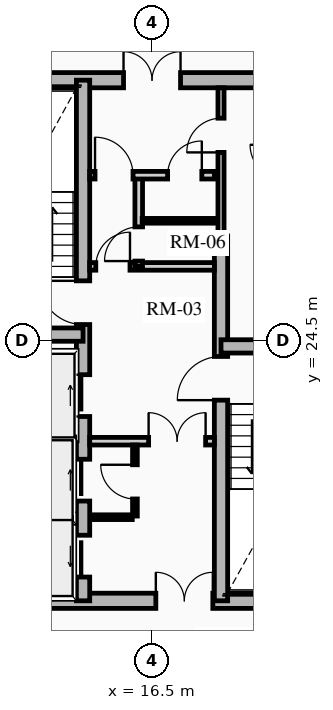
"""IFC4 building model, lengths in metres.
Left out: names, types, materials, properties, quantities, classifications, styles, units other than length and angle.
Written with IfcOpenShell. Run it as: python <this file> out.ifc"""

import sys

from ifc_helpers import new_model, si_unit, direction, frame, frame_2d, origin, place, context, subcontext, project, spatial, rectangle, extrude, source, transform, mapped, element, fill, save


model = new_model("IFC4")
c1 = context("Model", 3, precision=1e-05, world=origin(), true_north=direction((0.0, 1.0)))
c2 = subcontext(c1, "Body", "Model", "MODEL_VIEW")
j1 = project(units=[si_unit("LENGTHUNIT", "METRE"), si_unit("PLANEANGLEUNIT", "RADIAN")], contexts=[c1])
p1 = place(None, origin())
s1 = spatial("IfcSite", under=j1, at=p1, CompositionType="ELEMENT")
p2 = place(p1, origin())
s2 = spatial("IfcBuilding", under=s1, at=p2, CompositionType="ELEMENT")
p3 = place(p2, frame((0.0, 0.0, 169.06)))
s3 = spatial("IfcBuildingStorey", under=s2, at=p3, CompositionType="ELEMENT", Elevation=169.06)
p4 = place(p3, frame((11.15, 17.65, 0.0), z_axis=(0.0, 0.0, 1.0), x_axis=(1.0, 0.0, 0.0)))
e1 = element("IfcWall", 1, at=p4, inside=s3, PredefinedType="SHEAR", context=c2, shape_type="SweptSolid", body=[
    extrude(rectangle(XDim=10.7, YDim=0.4, at=frame_2d((5.35, 0.0))), origin(), (0.0, 0.0, 1.0), 2.91),
])
m1 = source(origin(), c2, "Body", "SweptSolid", [
    extrude(rectangle(XDim=1.5, YDim=2.02, at=frame_2d((0.75, 1.01))), frame((0.0, 0.21, 0.0), z_axis=(0.0, -1.0, 0.0), x_axis=(1.0, 0.0, 0.0)), (0.0, 0.0, 1.0), 0.42),
])
p5 = place(p4, frame((5.45, 0.0, 0.0)))
e2 = element("IfcOpeningElement", 2, at=p5, cuts=e1, PredefinedType="OPENING", context=c2, shape_type="MappedRepresentation", body=[
    mapped(m1, transform((0.0, 0.0, 0.0), x_axis=(1.0, 0.0, 0.0), y_axis=(0.0, 1.0, 0.0), z_axis=(0.0, 0.0, 1.0), scale=1.0)),
])
p6 = place(p3, frame((11.15, 31.35, 0.0), z_axis=(0.0, 0.0, 1.0), x_axis=(1.0, 0.0, 0.0)))
e3 = element("IfcWall", 3, at=p6, inside=s3, PredefinedType="SHEAR", context=c2, shape_type="SweptSolid", body=[
    extrude(rectangle(XDim=10.7, YDim=0.4, at=frame_2d((5.35, 0.0))), origin(), (0.0, 0.0, 1.0), 2.91),
])
p7 = place(p6, frame((4.6, 0.0, 0.0)))
e4 = element("IfcOpeningElement", 4, at=p7, cuts=e3, PredefinedType="OPENING", context=c2, shape_type="MappedRepresentation", body=[
    mapped(m1, transform((0.0, 0.0, 0.0), x_axis=(1.0, 0.0, 0.0), y_axis=(0.0, 1.0, 0.0), z_axis=(0.0, 0.0, 1.0), scale=1.0)),
])
p8 = place(p3, frame((14.685, 17.65, 0.0), z_axis=(0.0, 0.0, 1.0), x_axis=(0.0, 1.0, 0.0)))
e5 = element("IfcWall", 5, at=p8, inside=s3, PredefinedType="SHEAR", context=c2, shape_type="SweptSolid", body=[
    extrude(rectangle(XDim=13.7, YDim=0.35, at=frame_2d((6.85, 0.0))), origin(), (0.0, 0.0, 1.0), 2.91),
])
m2 = source(origin(), c2, "Body", "SweptSolid", [
    extrude(rectangle(XDim=1.1, YDim=2.015, at=frame_2d((0.55, 1.007))), frame((0.0, 0.185, 0.0), z_axis=(0.0, -1.0, 0.0), x_axis=(1.0, 0.0, 0.0)), (0.0, 0.0, 1.0), 0.37),
])
p9 = place(p8, frame((4.85, 0.0, 0.0)))
e6 = element("IfcOpeningElement", 6, at=p9, cuts=e5, PredefinedType="OPENING", context=c2, shape_type="MappedRepresentation", body=[
    mapped(m2, transform((0.0, 0.0, 0.0), x_axis=(1.0, 0.0, 0.0), y_axis=(0.0, 1.0, 0.0), z_axis=(0.0, 0.0, 1.0), scale=1.0)),
])
p10 = place(p8, frame((0.625, 0.0, 0.0)))
e7 = element("IfcOpeningElement", 7, at=p10, cuts=e5, PredefinedType="OPENING", context=c2, shape_type="MappedRepresentation", body=[
    mapped(m2, transform((0.0, 0.0, 0.0), x_axis=(1.0, 0.0, 0.0), y_axis=(0.0, 1.0, 0.0), z_axis=(0.0, 0.0, 1.0), scale=1.0)),
])
p11 = place(p8, frame((2.625, 0.0, 0.0)))
e8 = element("IfcOpeningElement", 8, at=p11, cuts=e5, PredefinedType="OPENING", context=c2, shape_type="MappedRepresentation", body=[
    mapped(m2, transform((0.0, 0.0, 0.0), x_axis=(1.0, 0.0, 0.0), y_axis=(0.0, 1.0, 0.0), z_axis=(0.0, 0.0, 1.0), scale=1.0)),
])
m3 = source(origin(), c2, "Body", "SweptSolid", [
    extrude(rectangle(XDim=1.15, YDim=2.02, at=frame_2d((0.575, 1.01))), frame((0.0, 0.185, 0.0), z_axis=(0.0, -1.0, 0.0), x_axis=(1.0, 0.0, 0.0)), (0.0, 0.0, 1.0), 0.37),
])
p12 = place(p8, frame((7.27, 0.0, 0.0)))
e9 = element("IfcOpeningElement", 9, at=p12, cuts=e5, PredefinedType="OPENING", context=c2, shape_type="MappedRepresentation", body=[
    mapped(m3, transform((0.0, 0.0, 0.0), x_axis=(1.0, 0.0, 0.0), y_axis=(0.0, 1.0, 0.0), z_axis=(0.0, 0.0, 1.0), scale=1.0)),
])
p13 = place(p3, frame((18.315, 17.65, 0.0), z_axis=(0.0, 0.0, 1.0), x_axis=(0.0, 1.0, 0.0)))
e10 = element("IfcWall", 10, at=p13, inside=s3, PredefinedType="SHEAR", context=c2, shape_type="SweptSolid", body=[
    extrude(rectangle(XDim=9.6, YDim=0.35, at=frame_2d((4.8, 0.0))), origin(), (0.0, 0.0, 1.0), 2.91),
])
p14 = place(p13, frame((5.28, 0.0, 0.0)))
e11 = element("IfcOpeningElement", 11, at=p14, cuts=e10, PredefinedType="OPENING", context=c2, shape_type="MappedRepresentation", body=[
    mapped(m3, transform((0.0, 0.0, 0.0), x_axis=(1.0, 0.0, 0.0), y_axis=(0.0, 1.0, 0.0), z_axis=(0.0, 0.0, 1.0), scale=1.0)),
])
for number, where, z_axis, x_axis in (
    (12, (11.4, 24.655, 0.0), (0.0, 0.0, 1.0), (1.0, 0.0, 0.0)),
    (13, (18.315, 24.345, 0.0), (0.0, 0.0, 1.0), (1.0, 0.0, 0.0)),
):
    element("IfcWall", number, at=place(p3, frame(where, z_axis=z_axis, x_axis=x_axis)), inside=s3, PredefinedType="SHEAR", context=c2, shape_type="SweptSolid", body=[
        extrude(rectangle(XDim=3.285, YDim=0.35, at=frame_2d((1.643, 0.0))), origin(), (0.0, 0.0, 1.0), 2.91),
    ])
for number, where, z_axis, x_axis in (
    (14, (11.52, 21.8, 0.0), (0.0, 0.0, 1.0), (1.0, 0.0, 0.0)),
    (15, (11.52, 19.825, 0.0), (0.0, 0.0, 1.0), (1.0, 0.0, 0.0)),
):
    element("IfcWall", number, at=place(p3, frame(where, z_axis=z_axis, x_axis=x_axis)), inside=s3, PredefinedType="SHEAR", context=c2, shape_type="SweptSolid", body=[
        extrude(rectangle(XDim=2.97, YDim=0.2, at=frame_2d((1.485, 0.0))), origin(), (0.0, 0.0, 1.0), 2.91),
    ])
p15 = place(p3, frame((14.86, 21.85, 0.0), z_axis=(0.0, 0.0, 1.0), x_axis=(1.0, 0.0, 0.0)))
e16 = element("IfcWall", 16, at=p15, inside=s3, PredefinedType="PARTITIONING", context=c2, shape_type="SweptSolid", body=[
    extrude(rectangle(XDim=3.28, YDim=0.2, at=frame_2d((1.64, 0.0))), origin(), (0.0, 0.0, 1.0), 2.675),
])
m4 = source(origin(), c2, "Body", "SweptSolid", [
    extrude(rectangle(XDim=1.5, YDim=2.02, at=frame_2d((0.75, 1.01))), frame((0.0, 0.11, 0.0), z_axis=(0.0, -1.0, 0.0), x_axis=(1.0, 0.0, 0.0)), (0.0, 0.0, 1.0), 0.22),
])
p16 = place(p15, frame((1.55, 0.0, 0.0)))
e17 = element("IfcOpeningElement", 17, at=p16, cuts=e16, PredefinedType="OPENING", context=c2, shape_type="MappedRepresentation", body=[
    mapped(m4, transform((0.0, 0.0, 0.0), x_axis=(1.0, 0.0, 0.0), y_axis=(0.0, 1.0, 0.0), z_axis=(0.0, 0.0, 1.0), scale=1.0)),
])
p17 = place(p3, frame((14.86, 26.45, 0.0), z_axis=(0.0, 0.0, 1.0), x_axis=(1.0, 0.0, 0.0)))
e18 = element("IfcWall", 18, at=p17, inside=s3, PredefinedType="PARTITIONING", context=c2, shape_type="SweptSolid", body=[
    extrude(rectangle(XDim=3.28, YDim=0.2, at=frame_2d((1.64, 0.0))), origin(), (0.0, 0.0, 1.0), 2.675),
])
m5 = source(origin(), c2, "Body", "SweptSolid", [
    extrude(rectangle(XDim=0.9, YDim=2.005, at=frame_2d((0.45, 1.002))), frame((0.0, 0.11, 0.0), z_axis=(0.0, -1.0, 0.0), x_axis=(1.0, 0.0, 0.0)), (0.0, 0.0, 1.0), 0.22),
])
p18 = place(p17, frame((0.16, 0.0, 0.0)))
e19 = element("IfcOpeningElement", 19, at=p18, cuts=e18, PredefinedType="OPENING", context=c2, shape_type="MappedRepresentation", body=[
    mapped(m5, transform((0.0, 0.0, 0.0), x_axis=(1.0, 0.0, 0.0), y_axis=(0.0, 1.0, 0.0), z_axis=(0.0, 0.0, 1.0), scale=1.0)),
])
p19 = place(p3, frame((16.15, 26.45, 0.0), z_axis=(0.0, 0.0, 1.0), x_axis=(0.0, 1.0, 0.0)))
e20 = element("IfcWall", 20, at=p19, inside=s3, PredefinedType="PARTITIONING", context=c2, shape_type="SweptSolid", body=[
    extrude(rectangle(XDim=2.4, YDim=0.2, at=frame_2d((1.2, 0.0))), origin(), (0.0, 0.0, 1.0), 2.675),
])
p20 = place(p19, frame((0.14, 0.0, 0.0)))
e21 = element("IfcOpeningElement", 21, at=p20, cuts=e20, PredefinedType="OPENING", context=c2, shape_type="MappedRepresentation", body=[
    mapped(m5, transform((0.0, 0.0, 0.0), x_axis=(1.0, 0.0, 0.0), y_axis=(0.0, 1.0, 0.0), z_axis=(0.0, 0.0, 1.0), scale=1.0)),
])
p21 = place(p3, frame((14.86, 28.85, 0.0), z_axis=(0.0, 0.0, 1.0), x_axis=(1.0, 0.0, 0.0)))
e22 = element("IfcWall", 22, at=p21, inside=s3, PredefinedType="PARTITIONING", context=c2, shape_type="SweptSolid", body=[
    extrude(rectangle(XDim=3.28, YDim=0.2, at=frame_2d((1.64, 0.0))), origin(), (0.0, 0.0, 1.0), 2.675),
])
m6 = source(origin(), c2, "Body", "SweptSolid", [
    extrude(rectangle(XDim=1.0, YDim=2.015, at=frame_2d((0.5, 1.007))), frame((0.0, 0.11, 0.0), z_axis=(0.0, -1.0, 0.0), x_axis=(1.0, 0.0, 0.0)), (0.0, 0.0, 1.0), 0.22),
])
p22 = place(p21, frame((0.14, 0.0, 0.0)))
e23 = element("IfcOpeningElement", 23, at=p22, cuts=e22, PredefinedType="OPENING", context=c2, shape_type="MappedRepresentation", body=[
    mapped(m6, transform((0.0, 0.0, 0.0), x_axis=(1.0, 0.0, 0.0), y_axis=(0.0, 1.0, 0.0), z_axis=(0.0, 0.0, 1.0), scale=1.0)),
])
p23 = place(p21, frame((2.05, 0.0, 0.0)))
e24 = element("IfcOpeningElement", 24, at=p23, cuts=e22, PredefinedType="OPENING", context=c2, shape_type="MappedRepresentation", body=[
    mapped(m5, transform((0.0, 0.0, 0.0), x_axis=(1.0, 0.0, 0.0), y_axis=(0.0, 1.0, 0.0), z_axis=(0.0, 0.0, 1.0), scale=1.0)),
])
p24 = place(p3, frame((16.05, 19.88, 0.0), z_axis=(0.0, 0.0, 1.0), x_axis=(0.0, 1.0, 0.0)))
e25 = element("IfcWall", 25, at=p24, inside=s3, PredefinedType="PARTITIONING", context=c2, shape_type="SweptSolid", body=[
    extrude(rectangle(XDim=1.87, YDim=0.125, at=frame_2d((0.935, 0.0))), origin(), (0.0, 0.0, 1.0), 2.675),
])
m7 = source(origin(), c2, "Body", "SweptSolid", [
    extrude(rectangle(XDim=0.9, YDim=2.005, at=frame_2d((0.45, 1.002))), frame((0.0, 0.073, 0.0), z_axis=(0.0, -1.0, 0.0), x_axis=(1.0, 0.0, 0.0)), (0.0, 0.0, 1.0), 0.145),
])
p25 = place(p24, frame((0.45, 0.0, 0.0)))
e26 = element("IfcOpeningElement", 26, at=p25, cuts=e25, PredefinedType="OPENING", context=c2, shape_type="MappedRepresentation", body=[
    mapped(m7, transform((0.0, 0.0, 0.0), x_axis=(1.0, 0.0, 0.0), y_axis=(0.0, 1.0, 0.0), z_axis=(0.0, 0.0, 1.0), scale=1.0)),
])
p26 = place(p3, frame((14.88, 19.85, 0.0), z_axis=(0.0, 0.0, 1.0), x_axis=(1.0, 0.0, 0.0)))
e27 = element("IfcWall", 27, at=p26, inside=s3, PredefinedType="PARTITIONING", context=c2, shape_type="SweptSolid", body=[
    extrude(rectangle(XDim=1.1, YDim=0.125, at=frame_2d((0.55, 0.0))), origin(), (0.0, 0.0, 1.0), 2.675),
])
p27 = place(p3, frame((16.24, 27.65, 0.0), z_axis=(0.0, 0.0, 1.0), x_axis=(1.0, 0.0, 0.0)))
e28 = element("IfcWall", 28, at=p27, inside=s3, PredefinedType="PARTITIONING", context=c2, shape_type="SweptSolid", body=[
    extrude(rectangle(XDim=1.88, YDim=0.125, at=frame_2d((0.94, 0.0))), origin(), (0.0, 0.0, 1.0), 2.675),
])
p28 = place(p3, frame((18.315, 27.25, 0.0), z_axis=(0.0, 0.0, 1.0), x_axis=(0.0, 1.0, 0.0)))
e29 = element("IfcWall", 29, at=p28, inside=s3, PredefinedType="PARTITIONING", context=c2, shape_type="SweptSolid", body=[
    extrude(rectangle(XDim=3.9, YDim=0.16, at=frame_2d((1.95, 0.0))), origin(), (0.0, 0.0, 1.0), 2.675),
])
m8 = source(origin(), c2, "Body", "SweptSolid", [
    extrude(rectangle(XDim=0.9, YDim=2.005, at=frame_2d((0.45, 1.002))), frame((0.0, 0.09, 0.0), z_axis=(0.0, -1.0, 0.0), x_axis=(1.0, 0.0, 0.0)), (0.0, 0.0, 1.0), 0.18),
])
p29 = place(p28, frame((2.2, 0.0, 0.0)))
e30 = element("IfcOpeningElement", 30, at=p29, cuts=e29, PredefinedType="OPENING", context=c2, shape_type="MappedRepresentation", body=[
    mapped(m8, transform((0.0, 0.0, 0.0), x_axis=(1.0, 0.0, 0.0), y_axis=(0.0, 1.0, 0.0), z_axis=(0.0, 0.0, 1.0), scale=1.0)),
])
m9 = source(origin(), c2, "Body", "SweptSolid", [
    extrude(rectangle(XDim=1.1, YDim=2.015, at=frame_2d((0.55, 1.007))), frame((0.0, 0.025, 0.0), z_axis=(0.0, -1.0, 0.0), x_axis=(1.0, 0.0, 0.0)), (0.0, 0.0, 1.0), 0.05),
])
p30 = place(p9, origin())
e31 = element("IfcDoor", 31, at=p30, inside=s3, OperationType="SLIDING_TO_RIGHT", PredefinedType="DOOR", context=c2, shape_type="MappedRepresentation", body=[
    mapped(m9, transform((0.0, 0.0, 0.0), x_axis=(1.0, 0.0, 0.0), y_axis=(0.0, 1.0, 0.0), z_axis=(0.0, 0.0, 1.0), scale=1.0)),
])
fill(e6, e31)
p31 = place(p10, origin())
e32 = element("IfcDoor", 32, at=p31, inside=s3, OperationType="SLIDING_TO_LEFT", PredefinedType="DOOR", context=c2, shape_type="MappedRepresentation", body=[
    mapped(m9, transform((0.0, 0.0, 0.0), x_axis=(1.0, 0.0, 0.0), y_axis=(0.0, 1.0, 0.0), z_axis=(0.0, 0.0, 1.0), scale=1.0)),
])
fill(e7, e32)
p32 = place(p11, origin())
e33 = element("IfcDoor", 33, at=p32, inside=s3, OperationType="SLIDING_TO_RIGHT", PredefinedType="DOOR", context=c2, shape_type="MappedRepresentation", body=[
    mapped(m9, transform((0.0, 0.0, 0.0), x_axis=(1.0, 0.0, 0.0), y_axis=(0.0, 1.0, 0.0), z_axis=(0.0, 0.0, 1.0), scale=1.0)),
])
fill(e8, e33)
m10 = source(origin(), c2, "Body", "SweptSolid", [
    extrude(rectangle(XDim=1.15, YDim=2.02, at=frame_2d((0.575, 1.01))), frame((0.0, 0.025, 0.0), z_axis=(0.0, -1.0, 0.0), x_axis=(1.0, 0.0, 0.0)), (0.0, 0.0, 1.0), 0.05),
])
p33 = place(p12, origin())
e34 = element("IfcDoor", 34, at=p33, inside=s3, OperationType="SINGLE_SWING_RIGHT", PredefinedType="DOOR", context=c2, shape_type="MappedRepresentation", body=[
    mapped(m10, transform((0.0, 0.0, 0.0), x_axis=(1.0, 0.0, 0.0), y_axis=(0.0, 1.0, 0.0), z_axis=(0.0, 0.0, 1.0), scale=1.0)),
])
fill(e9, e34)
p34 = place(p14, origin())
e35 = element("IfcDoor", 35, at=p34, inside=s3, OperationType="SINGLE_SWING_LEFT", PredefinedType="DOOR", context=c2, shape_type="MappedRepresentation", body=[
    mapped(m10, transform((0.0, 0.0, 0.0), x_axis=(1.0, 0.0, 0.0), y_axis=(0.0, 1.0, 0.0), z_axis=(0.0, 0.0, 1.0), scale=1.0)),
])
fill(e11, e35)
m11 = source(origin(), c2, "Body", "SweptSolid", [
    extrude(rectangle(XDim=1.5, YDim=2.02, at=frame_2d((0.75, 1.01))), frame((0.0, 0.025, 0.0), z_axis=(0.0, -1.0, 0.0), x_axis=(1.0, 0.0, 0.0)), (0.0, 0.0, 1.0), 0.05),
])
p35 = place(p7, origin())
e36 = element("IfcDoor", 36, at=p35, inside=s3, OperationType="DOUBLE_DOOR_SINGLE_SWING", PredefinedType="DOOR", context=c2, shape_type="MappedRepresentation", body=[
    mapped(m11, transform((0.0, 0.0, 0.0), x_axis=(1.0, 0.0, 0.0), y_axis=(0.0, 1.0, 0.0), z_axis=(0.0, 0.0, 1.0), scale=1.0)),
])
fill(e4, e36)
p36 = place(p5, origin())
e37 = element("IfcDoor", 37, at=p36, inside=s3, OperationType="DOUBLE_DOOR_SINGLE_SWING", PredefinedType="DOOR", context=c2, shape_type="MappedRepresentation", body=[
    mapped(m11, transform((0.0, 0.0, 0.0), x_axis=(1.0, 0.0, 0.0), y_axis=(0.0, 1.0, 0.0), z_axis=(0.0, 0.0, 1.0), scale=1.0)),
])
fill(e2, e37)
p37 = place(p16, origin())
e38 = element("IfcDoor", 38, at=p37, inside=s3, OperationType="DOUBLE_DOOR_SINGLE_SWING", PredefinedType="DOOR", context=c2, shape_type="MappedRepresentation", body=[
    mapped(m11, transform((0.0, 0.0, 0.0), x_axis=(1.0, 0.0, 0.0), y_axis=(0.0, 1.0, 0.0), z_axis=(0.0, 0.0, 1.0), scale=1.0)),
])
fill(e17, e38)
m12 = source(origin(), c2, "Body", "SweptSolid", [
    extrude(rectangle(XDim=0.9, YDim=2.005, at=frame_2d((0.45, 1.002))), frame((0.0, 0.025, 0.0), z_axis=(0.0, -1.0, 0.0), x_axis=(1.0, 0.0, 0.0)), (0.0, 0.0, 1.0), 0.05),
])
p38 = place(p18, origin())
e39 = element("IfcDoor", 39, at=p38, inside=s3, OperationType="SINGLE_SWING_RIGHT", PredefinedType="DOOR", context=c2, shape_type="MappedRepresentation", body=[
    mapped(m12, transform((0.0, 0.0, 0.0), x_axis=(1.0, 0.0, 0.0), y_axis=(0.0, 1.0, 0.0), z_axis=(0.0, 0.0, 1.0), scale=1.0)),
])
fill(e19, e39)
m13 = source(origin(), c2, "Body", "SweptSolid", [
    extrude(rectangle(XDim=1.0, YDim=2.015, at=frame_2d((0.5, 1.007))), frame((0.0, 0.025, 0.0), z_axis=(0.0, -1.0, 0.0), x_axis=(1.0, 0.0, 0.0)), (0.0, 0.0, 1.0), 0.05),
])
p39 = place(p22, origin())
e40 = element("IfcDoor", 40, at=p39, inside=s3, OperationType="SINGLE_SWING_LEFT", PredefinedType="DOOR", context=c2, shape_type="MappedRepresentation", body=[
    mapped(m13, transform((0.0, 0.0, 0.0), x_axis=(1.0, 0.0, 0.0), y_axis=(0.0, 1.0, 0.0), z_axis=(0.0, 0.0, 1.0), scale=1.0)),
])
fill(e23, e40)
p40 = place(p25, origin())
e41 = element("IfcDoor", 41, at=p40, inside=s3, OperationType="SINGLE_SWING_RIGHT", PredefinedType="DOOR", context=c2, shape_type="MappedRepresentation", body=[
    mapped(m12, transform((0.0, 0.0, 0.0), x_axis=(1.0, 0.0, 0.0), y_axis=(0.0, 1.0, 0.0), z_axis=(0.0, 0.0, 1.0), scale=1.0)),
])
fill(e26, e41)
p41 = place(p20, origin())
e42 = element("IfcDoor", 42, at=p41, inside=s3, OperationType="SINGLE_SWING_LEFT", PredefinedType="DOOR", context=c2, shape_type="MappedRepresentation", body=[
    mapped(m12, transform((0.0, 0.0, 0.0), x_axis=(1.0, 0.0, 0.0), y_axis=(0.0, 1.0, 0.0), z_axis=(0.0, 0.0, 1.0), scale=1.0)),
])
fill(e21, e42)
p42 = place(p23, origin())
e43 = element("IfcDoor", 43, at=p42, inside=s3, OperationType="SINGLE_SWING_RIGHT", PredefinedType="DOOR", context=c2, shape_type="MappedRepresentation", body=[
    mapped(m12, transform((0.0, 0.0, 0.0), x_axis=(1.0, 0.0, 0.0), y_axis=(0.0, 1.0, 0.0), z_axis=(0.0, 0.0, 1.0), scale=1.0)),
])
fill(e24, e43)
p43 = place(p29, origin())
e44 = element("IfcDoor", 44, at=p43, inside=s3, OperationType="SINGLE_SWING_LEFT", PredefinedType="DOOR", context=c2, shape_type="MappedRepresentation", body=[
    mapped(m12, transform((0.0, 0.0, 0.0), x_axis=(1.0, 0.0, 0.0), y_axis=(0.0, 1.0, 0.0), z_axis=(0.0, 0.0, 1.0), scale=1.0)),
])
fill(e30, e44)
save(model, sys.argv[1])
